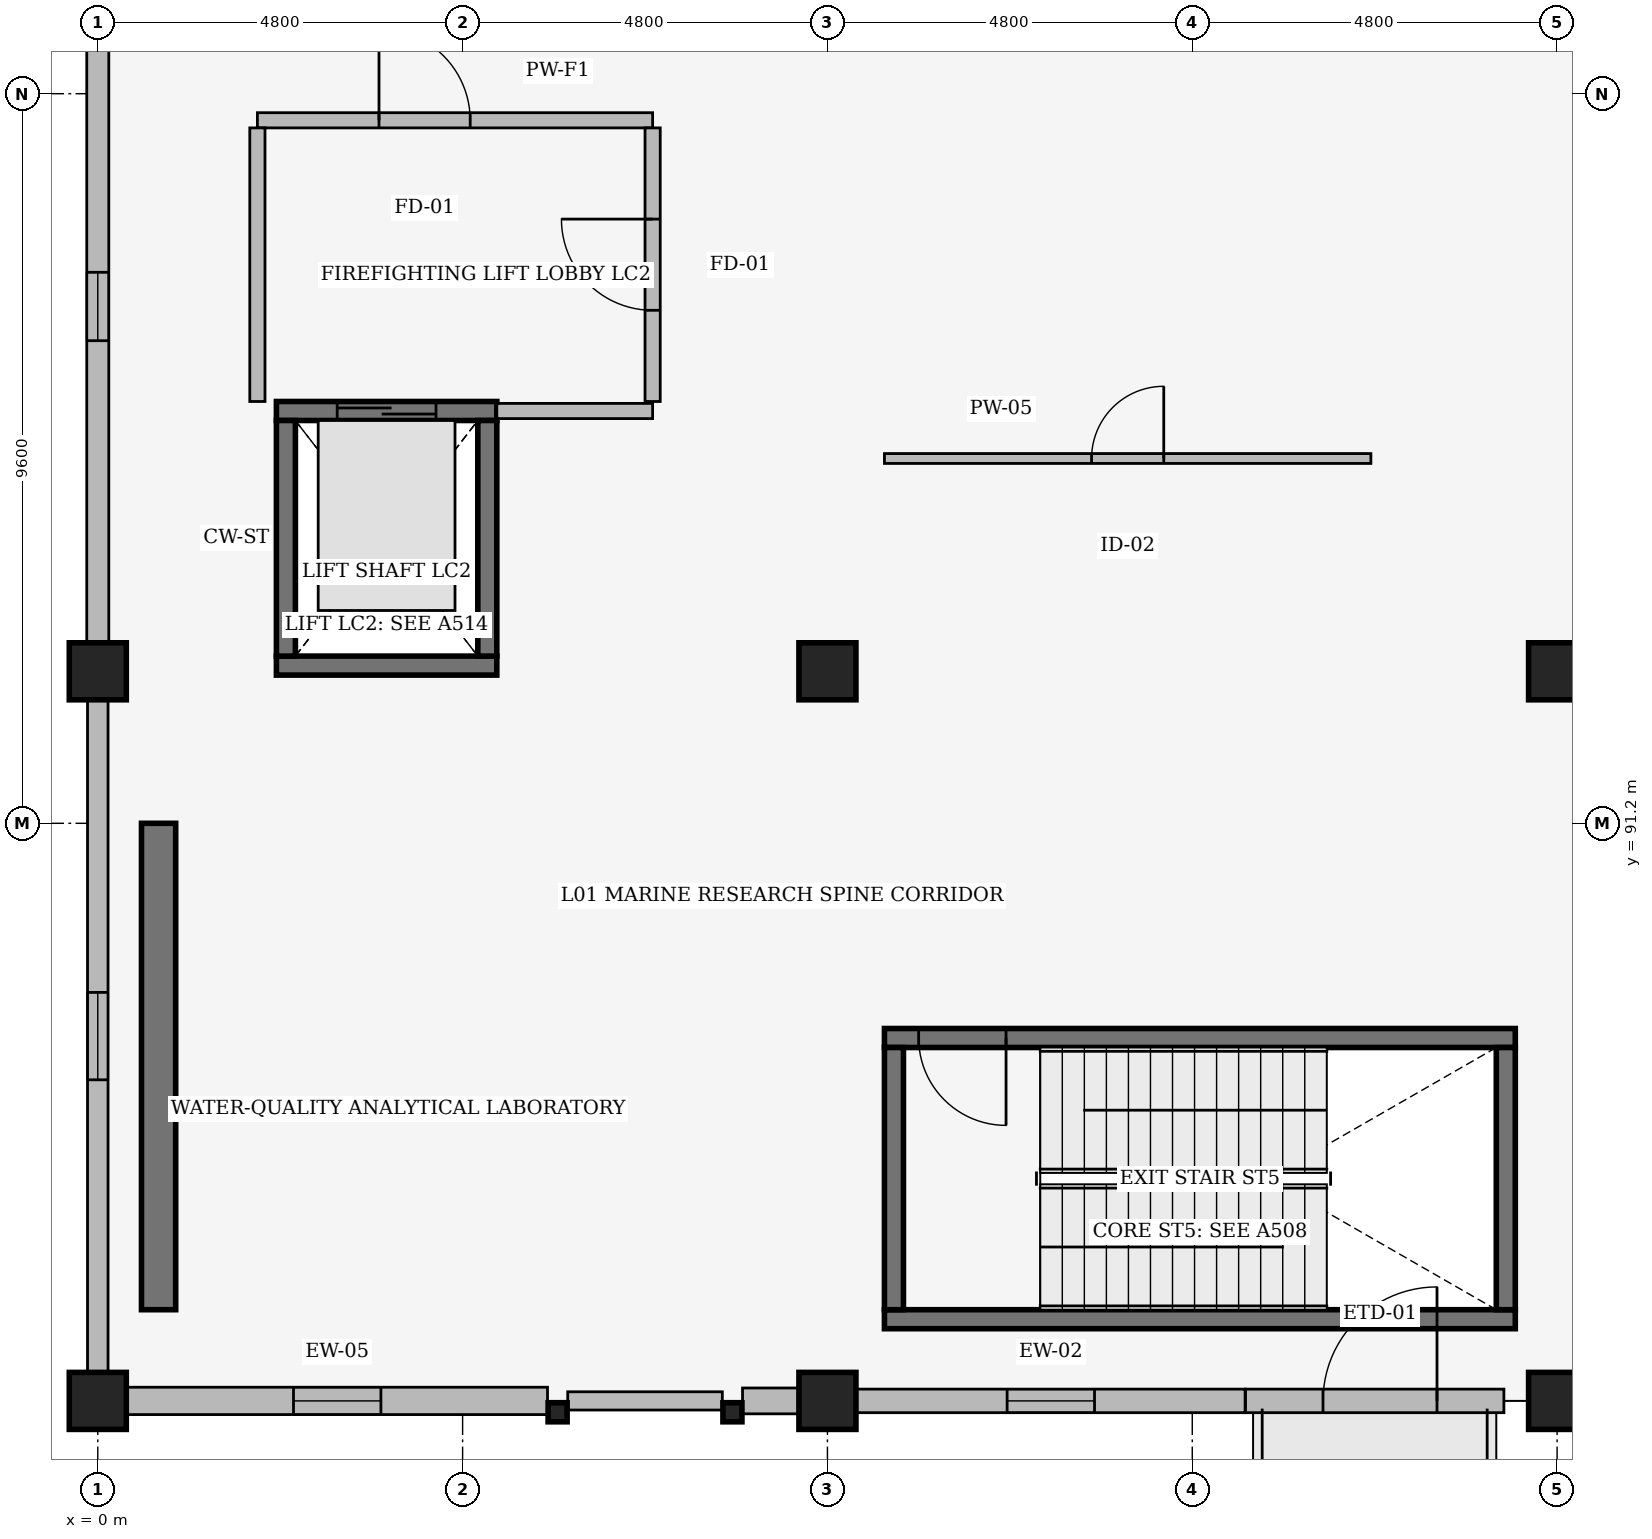
"""IFC4 building model, lengths in metres.
Left out: names, types, materials, properties, quantities, classifications, styles, units other than length and angle.
Written with IfcOpenShell. Run it as: python <this file> out.ifc"""

import sys

from ifc_helpers import new_model, si_unit, direction, frame, frame_2d, origin, origin_2d, place, context, subcontext, project, spatial, rectangle, hollow_rectangle, extrude, element, fill, save


model = new_model("IFC4")
c1 = context("Model", 3, precision=1e-05, world=origin(), true_north=direction((0.0, 1.0)))
c2 = subcontext(c1, "Body", "Model", "MODEL_VIEW")
j1 = project(units=[si_unit("LENGTHUNIT", "METRE"), si_unit("PLANEANGLEUNIT", "RADIAN")], contexts=[c1])
p1 = place(None, origin())
s1 = spatial("IfcSite", under=j1, at=p1, CompositionType="ELEMENT")
p2 = place(p1, origin())
s2 = spatial("IfcBuilding", under=s1, at=p2, CompositionType="ELEMENT")
p3 = place(p2, frame((0.0, 0.0, 5.4)))
s3 = spatial("IfcBuildingStorey", under=s2, at=p3, CompositionType="ELEMENT", Elevation=5.4)
for number, where, z_axis, x_axis in (
    (1, (0.0, 83.6, 0.0), (0.0, 0.0, 1.0), (1.0, 0.0, 0.0)),
    (2, (0.0, 93.2, 0.0), (0.0, 0.0, 1.0), (1.0, 0.0, 0.0)),
    (3, (9.6, 83.6, 0.0), (0.0, 0.0, 1.0), (1.0, 0.0, 0.0)),
    (4, (9.6, 93.2, 0.0), (0.0, 0.0, 1.0), (1.0, 0.0, 0.0)),
    (5, (19.2, 83.6, 0.0), (0.0, 0.0, 1.0), (1.0, 0.0, 0.0)),
    (6, (19.2, 93.2, 0.0), (0.0, 0.0, 1.0), (1.0, 0.0, 0.0)),
):
    element("IfcColumn", number, at=place(p3, frame(where, z_axis=z_axis, x_axis=x_axis)), inside=s3, PredefinedType="COLUMN", context=c2, shape_type="SweptSolid", body=[
        extrude(rectangle(XDim=0.75, YDim=0.75, at=origin_2d()), origin(), (0.0, 0.0, 1.0), 5.1),
    ])
for number, where, z_axis, x_axis in (
    (7, (6.05, 83.45, 0.0), (0.0, 0.0, 1.0), (1.0, 0.0, 0.0)),
    (8, (8.35, 83.45, 0.0), (0.0, 0.0, 1.0), (1.0, 0.0, 0.0)),
):
    element("IfcColumn", number, at=place(p3, frame(where, z_axis=z_axis, x_axis=x_axis)), inside=s3, PredefinedType="COLUMN", context=c2, shape_type="SweptSolid", body=[
        extrude(hollow_rectangle(XDim=0.25, YDim=0.25, WallThickness=0.012, InnerFilletRadius=0.012, OuterFilletRadius=0.025, at=origin_2d()), origin(), (0.0, 0.0, 1.0), 4.351),
    ])
p4 = place(p3, frame((0.8, 84.8, 0.0), z_axis=(0.0, 0.0, 1.0), x_axis=(0.0, 1.0, 0.0)))
e9 = element("IfcWall", 9, at=p4, inside=s3, PredefinedType="SHEAR", context=c2, shape_type="SweptSolid", body=[
    extrude(rectangle(XDim=6.4, YDim=0.45, at=frame_2d((3.2, 0.0))), origin(), (0.0, 0.0, 1.0), 5.1),
])
p5 = place(p3, frame((15.1, 83.6, 0.0), z_axis=(0.0, 0.0, 1.0), x_axis=(1.0, 0.0, 0.0)))
e10 = element("IfcWall", 10, at=p5, inside=s3, PredefinedType="SOLIDWALL", context=c2, shape_type="SweptSolid", body=[
    extrude(rectangle(XDim=3.4, YDim=0.31, at=frame_2d((1.7, 0.0))), origin(), (0.0, 0.0, 1.0), 4.563),
])
p6 = place(p5, frame((2.52, 0.0, 0.0), z_axis=(0.0, 0.0, 1.0), x_axis=(-1.0, 0.0, 0.0)))
e11 = element("IfcOpeningElement", 11, at=p6, cuts=e10, PredefinedType="OPENING", context=c2, shape_type="SweptSolid", body=[
    extrude(rectangle(XDim=1.5, YDim=2.25, at=frame_2d((0.75, 1.125))), frame((0.0, 0.165, 0.0), z_axis=(0.0, -1.0, 0.0), x_axis=(1.0, 0.0, 0.0)), (0.0, 0.0, 1.0), 0.33),
])
p7 = place(p3, frame((0.0, 102.417, 0.0), z_axis=(0.0, 0.0, 1.0), x_axis=(0.0, -1.0, 0.0)))
e12 = element("IfcWall", 12, at=p7, inside=s3, PredefinedType="SOLIDWALL", context=c2, shape_type="SweptSolid", body=[
    extrude(rectangle(XDim=8.834, YDim=0.29, at=frame_2d((4.417, 0.0))), origin(), (0.0, 0.0, 1.0), 4.349),
])
p8 = place(p7, frame((3.967, 0.0, 0.95)))
e13 = element("IfcOpeningElement", 13, at=p8, cuts=e12, PredefinedType="OPENING", context=c2, shape_type="SweptSolid", body=[
    extrude(rectangle(XDim=0.9, YDim=2.1, at=frame_2d((0.45, 1.05))), frame((0.0, 0.155, 0.0), z_axis=(0.0, -1.0, 0.0), x_axis=(1.0, 0.0, 0.0)), (0.0, 0.0, 1.0), 0.31),
])
p9 = place(p3, frame((0.0, 92.817, 0.0), z_axis=(0.0, 0.0, 1.0), x_axis=(0.0, -1.0, 0.0)))
e14 = element("IfcWall", 14, at=p9, inside=s3, PredefinedType="SOLIDWALL", context=c2, shape_type="SweptSolid", body=[
    extrude(rectangle(XDim=8.834, YDim=0.27, at=frame_2d((4.417, 0.0))), origin(), (0.0, 0.0, 1.0), 4.349),
])
p10 = place(p9, frame((3.842, 0.0, 0.95)))
e15 = element("IfcOpeningElement", 15, at=p10, cuts=e14, PredefinedType="OPENING", context=c2, shape_type="SweptSolid", body=[
    extrude(rectangle(XDim=1.15, YDim=1.2, at=frame_2d((0.575, 0.6))), frame((0.0, 0.145, 0.0), z_axis=(0.0, -1.0, 0.0), x_axis=(1.0, 0.0, 0.0)), (0.0, 0.0, 1.0), 0.29),
])
p11 = place(p3, frame((0.383, 83.6, 0.0), z_axis=(0.0, 0.0, 1.0), x_axis=(1.0, 0.0, 0.0)))
e16 = element("IfcWall", 16, at=p11, inside=s3, PredefinedType="SOLIDWALL", context=c2, shape_type="SweptSolid", body=[
    extrude(rectangle(XDim=5.534, YDim=0.36, at=frame_2d((2.767, 0.0))), origin(), (0.0, 0.0, 1.0), 4.321),
])
p12 = place(p11, frame((2.192, 0.0, 0.95)))
e17 = element("IfcOpeningElement", 17, at=p12, cuts=e16, PredefinedType="OPENING", context=c2, shape_type="SweptSolid", body=[
    extrude(rectangle(XDim=1.15, YDim=1.5, at=frame_2d((0.575, 0.75))), frame((0.0, 0.19, 0.0), z_axis=(0.0, -1.0, 0.0), x_axis=(1.0, 0.0, 0.0)), (0.0, 0.0, 1.0), 0.38),
])
p13 = place(p3, frame((6.183, 83.6, 0.0), z_axis=(0.0, 0.0, 1.0), x_axis=(1.0, 0.0, 0.0)))
e18 = element("IfcWall", 18, at=p13, inside=s3, PredefinedType="SOLIDWALL", context=c2, shape_type="SweptSolid", body=[
    extrude(rectangle(XDim=2.034, YDim=0.24, at=frame_2d((1.017, 0.0))), origin(), (0.0, 0.0, 1.0), 4.321),
])
p14 = place(p3, frame((8.483, 83.6, 0.0), z_axis=(0.0, 0.0, 1.0), x_axis=(1.0, 0.0, 0.0)))
e19 = element("IfcWall", 19, at=p14, inside=s3, PredefinedType="SOLIDWALL", context=c2, shape_type="SweptSolid", body=[
    extrude(rectangle(XDim=0.734, YDim=0.34, at=frame_2d((0.367, 0.0))), origin(), (0.0, 0.0, 1.0), 4.321),
])
p15 = place(p3, frame((9.983, 83.6, 0.0), z_axis=(0.0, 0.0, 1.0), x_axis=(1.0, 0.0, 0.0)))
e20 = element("IfcWall", 20, at=p15, inside=s3, PredefinedType="SOLIDWALL", context=c2, shape_type="SweptSolid", body=[
    extrude(rectangle(XDim=5.112, YDim=0.31, at=frame_2d((2.556, 0.0))), origin(), (0.0, 0.0, 1.0), 4.563),
])
p16 = place(p15, frame((1.981, 0.0, 0.95)))
e21 = element("IfcOpeningElement", 21, at=p16, cuts=e20, PredefinedType="OPENING", context=c2, shape_type="SweptSolid", body=[
    extrude(rectangle(XDim=1.15, YDim=1.8, at=frame_2d((0.575, 0.9))), frame((0.0, 0.165, 0.0), z_axis=(0.0, -1.0, 0.0), x_axis=(1.0, 0.0, 0.0)), (0.0, 0.0, 1.0), 0.33),
])
p17 = place(p3, frame((10.35, 84.675, 0.0), z_axis=(0.0, 0.0, 1.0), x_axis=(1.0, 0.0, 0.0)))
e22 = element("IfcWall", 22, at=p17, inside=s3, PredefinedType="SHEAR", context=c2, shape_type="SweptSolid", body=[
    extrude(rectangle(XDim=8.3, YDim=0.25, at=frame_2d((4.15, 0.0))), origin(), (0.0, 0.0, 1.0), 4.8),
])
p18 = place(p3, frame((18.65, 88.375, 0.0), z_axis=(0.0, 0.0, 1.0), x_axis=(-1.0, 0.0, 0.0)))
e23 = element("IfcWall", 23, at=p18, inside=s3, PredefinedType="SHEAR", context=c2, shape_type="SweptSolid", body=[
    extrude(rectangle(XDim=8.3, YDim=0.25, at=frame_2d((4.15, 0.0))), origin(), (0.0, 0.0, 1.0), 4.8),
])
p19 = place(p18, frame((7.85, 0.0, 0.0), z_axis=(0.0, 0.0, 1.0), x_axis=(-1.0, 0.0, 0.0)))
e24 = element("IfcOpeningElement", 24, at=p19, cuts=e23, PredefinedType="OPENING", context=c2, shape_type="SweptSolid", body=[
    extrude(rectangle(XDim=1.15, YDim=2.2, at=frame_2d((0.575, 1.1))), frame((0.0, 0.135, 0.0), z_axis=(0.0, -1.0, 0.0), x_axis=(1.0, 0.0, 0.0)), (0.0, 0.0, 1.0), 0.27),
])
for number, where, z_axis, x_axis in (
    (25, (10.475, 88.25, 0.0), (0.0, 0.0, 1.0), (0.0, -1.0, 0.0)),
    (26, (18.525, 84.8, 0.0), (0.0, 0.0, 1.0), (0.0, 1.0, 0.0)),
):
    element("IfcWall", number, at=place(p3, frame(where, z_axis=z_axis, x_axis=x_axis)), inside=s3, PredefinedType="SHEAR", context=c2, shape_type="SweptSolid", body=[
        extrude(rectangle(XDim=3.45, YDim=0.25, at=frame_2d((1.725, 0.0))), origin(), (0.0, 0.0, 1.0), 4.8),
    ])
p20 = place(p3, frame((2.35, 93.275, 0.0), z_axis=(0.0, 0.0, 1.0), x_axis=(1.0, 0.0, 0.0)))
e27 = element("IfcWall", 27, at=p20, inside=s3, PredefinedType="SHEAR", context=c2, shape_type="SweptSolid", body=[
    extrude(rectangle(XDim=2.9, YDim=0.25, at=frame_2d((1.45, 0.0))), origin(), (0.0, 0.0, 1.0), 4.8),
])
p21 = place(p3, frame((2.35, 96.625, 0.0), z_axis=(0.0, 0.0, 1.0), x_axis=(1.0, 0.0, 0.0)))
e28 = element("IfcWall", 28, at=p21, inside=s3, PredefinedType="SHEAR", context=c2, shape_type="SweptSolid", body=[
    extrude(rectangle(XDim=2.9, YDim=0.25, at=frame_2d((1.45, 0.0))), origin(), (0.0, 0.0, 1.0), 4.8),
])
p22 = place(p21, frame((0.8, 0.0, 0.0)))
e29 = element("IfcOpeningElement", 29, at=p22, cuts=e28, PredefinedType="OPENING", context=c2, shape_type="SweptSolid", body=[
    extrude(rectangle(XDim=1.3, YDim=2.2, at=frame_2d((0.65, 1.1))), frame((0.0, 0.135, 0.0), z_axis=(0.0, -1.0, 0.0), x_axis=(1.0, 0.0, 0.0)), (0.0, 0.0, 1.0), 0.27),
])
for number, where, z_axis, x_axis in (
    (30, (2.475, 93.4, 0.0), (0.0, 0.0, 1.0), (0.0, 1.0, 0.0)),
    (31, (5.125, 93.4, 0.0), (0.0, 0.0, 1.0), (0.0, 1.0, 0.0)),
):
    element("IfcWall", number, at=place(p3, frame(where, z_axis=z_axis, x_axis=x_axis)), inside=s3, PredefinedType="SHEAR", context=c2, shape_type="SweptSolid", body=[
        extrude(rectangle(XDim=3.1, YDim=0.25, at=frame_2d((1.55, 0.0))), origin(), (0.0, 0.0, 1.0), 4.8),
    ])
p23 = place(p3, frame((2.1, 100.45, 0.0), z_axis=(0.0, 0.0, 1.0), x_axis=(1.0, 0.0, 0.0)))
e32 = element("IfcWall", 32, at=p23, inside=s3, PredefinedType="PARTITIONING", context=c2, shape_type="SweptSolid", body=[
    extrude(rectangle(XDim=5.2, YDim=0.2, at=frame_2d((2.6, 0.0))), origin(), (0.0, 0.0, 1.0), 4.349),
])
p24 = place(p23, frame((1.6, 0.0, 0.0)))
e33 = element("IfcOpeningElement", 33, at=p24, cuts=e32, PredefinedType="OPENING", context=c2, shape_type="SweptSolid", body=[
    extrude(rectangle(XDim=1.2, YDim=2.2, at=frame_2d((0.6, 1.1))), frame((0.0, 0.11, 0.0), z_axis=(0.0, -1.0, 0.0), x_axis=(1.0, 0.0, 0.0)), (0.0, 0.0, 1.0), 0.22),
])
p25 = place(p3, frame((2.1, 96.75, 0.0), z_axis=(0.0, 0.0, 1.0), x_axis=(0.0, 1.0, 0.0)))
e34 = element("IfcWall", 34, at=p25, inside=s3, PredefinedType="PARTITIONING", context=c2, shape_type="SweptSolid", body=[
    extrude(rectangle(XDim=3.6, YDim=0.2, at=frame_2d((1.8, 0.0))), origin(), (0.0, 0.0, 1.0), 4.349),
])
p26 = place(p3, frame((7.3, 96.75, 0.0), z_axis=(0.0, 0.0, 1.0), x_axis=(0.0, 1.0, 0.0)))
e35 = element("IfcWall", 35, at=p26, inside=s3, PredefinedType="PARTITIONING", context=c2, shape_type="SweptSolid", body=[
    extrude(rectangle(XDim=3.6, YDim=0.2, at=frame_2d((1.8, 0.0))), origin(), (0.0, 0.0, 1.0), 4.349),
])
p27 = place(p26, frame((1.2, 0.0, 0.0)))
e36 = element("IfcOpeningElement", 36, at=p27, cuts=e35, PredefinedType="OPENING", context=c2, shape_type="SweptSolid", body=[
    extrude(rectangle(XDim=1.2, YDim=2.2, at=frame_2d((0.6, 1.1))), frame((0.0, 0.11, 0.0), z_axis=(0.0, -1.0, 0.0), x_axis=(1.0, 0.0, 0.0)), (0.0, 0.0, 1.0), 0.22),
])
p28 = place(p3, frame((5.25, 96.625, 0.0), z_axis=(0.0, 0.0, 1.0), x_axis=(1.0, 0.0, 0.0)))
e37 = element("IfcWall", 37, at=p28, inside=s3, PredefinedType="PARTITIONING", context=c2, shape_type="SweptSolid", body=[
    extrude(rectangle(XDim=2.05, YDim=0.2, at=frame_2d((1.025, 0.0))), origin(), (0.0, 0.0, 1.0), 4.74),
])
p29 = place(p3, frame((10.35, 96.0, 0.0), z_axis=(0.0, 0.0, 1.0), x_axis=(1.0, 0.0, 0.0)))
e38 = element("IfcWall", 38, at=p29, inside=s3, PredefinedType="PARTITIONING", context=c2, shape_type="SweptSolid", body=[
    extrude(rectangle(XDim=6.4, YDim=0.13, at=frame_2d((3.2, 0.0))), origin(), (0.0, 0.0, 1.0), 4.413),
])
p30 = place(p29, frame((2.725, 0.0, 0.0)))
e39 = element("IfcOpeningElement", 39, at=p30, cuts=e38, PredefinedType="OPENING", context=c2, shape_type="SweptSolid", body=[
    extrude(rectangle(XDim=0.95, YDim=2.15, at=frame_2d((0.475, 1.075))), frame((0.0, 0.075, 0.0), z_axis=(0.0, -1.0, 0.0), x_axis=(1.0, 0.0, 0.0)), (0.0, 0.0, 1.0), 0.15),
])
p31 = place(p6, origin())
e40 = element("IfcDoor", 40, at=p31, inside=s3, OperationType="SINGLE_SWING_LEFT", PredefinedType="DOOR", context=c2, shape_type="SweptSolid", body=[
    extrude(rectangle(XDim=1.5, YDim=2.25, at=frame_2d((0.75, 1.125))), frame((0.0, 0.025, 0.0), z_axis=(0.0, -1.0, 0.0), x_axis=(1.0, 0.0, 0.0)), (0.0, 0.0, 1.0), 0.05),
])
fill(e11, e40)
p32 = place(p8, origin())
e41 = element("IfcWindow", 41, at=p32, inside=s3, PartitioningType="SINGLE_PANEL", PredefinedType="WINDOW", context=c2, shape_type="SweptSolid", body=[
    extrude(rectangle(XDim=0.9, YDim=2.1, at=frame_2d((0.45, 1.05))), frame((0.0, 0.03, 0.0), z_axis=(0.0, -1.0, 0.0), x_axis=(1.0, 0.0, 0.0)), (0.0, 0.0, 1.0), 0.06),
])
fill(e13, e41)
p33 = place(p10, origin())
e42 = element("IfcWindow", 42, at=p33, inside=s3, PartitioningType="SINGLE_PANEL", PredefinedType="WINDOW", context=c2, shape_type="SweptSolid", body=[
    extrude(rectangle(XDim=1.15, YDim=1.2, at=frame_2d((0.575, 0.6))), frame((0.0, 0.03, 0.0), z_axis=(0.0, -1.0, 0.0), x_axis=(1.0, 0.0, 0.0)), (0.0, 0.0, 1.0), 0.06),
])
fill(e15, e42)
p34 = place(p12, origin())
e43 = element("IfcWindow", 43, at=p34, inside=s3, PartitioningType="SINGLE_PANEL", PredefinedType="WINDOW", context=c2, shape_type="SweptSolid", body=[
    extrude(rectangle(XDim=1.15, YDim=1.5, at=frame_2d((0.575, 0.75))), frame((0.0, 0.03, 0.0), z_axis=(0.0, -1.0, 0.0), x_axis=(1.0, 0.0, 0.0)), (0.0, 0.0, 1.0), 0.06),
])
fill(e17, e43)
p35 = place(p16, origin())
e44 = element("IfcWindow", 44, at=p35, inside=s3, PartitioningType="SINGLE_PANEL", PredefinedType="WINDOW", context=c2, shape_type="SweptSolid", body=[
    extrude(rectangle(XDim=1.15, YDim=1.8, at=frame_2d((0.575, 0.9))), frame((0.0, 0.03, 0.0), z_axis=(0.0, -1.0, 0.0), x_axis=(1.0, 0.0, 0.0)), (0.0, 0.0, 1.0), 0.06),
])
fill(e21, e44)
p36 = place(p19, origin())
e45 = element("IfcDoor", 45, at=p36, inside=s3, OperationType="SINGLE_SWING_RIGHT", PredefinedType="DOOR", context=c2, shape_type="SweptSolid", body=[
    extrude(rectangle(XDim=1.15, YDim=2.2, at=frame_2d((0.575, 1.1))), frame((0.0, 0.025, 0.0), z_axis=(0.0, -1.0, 0.0), x_axis=(1.0, 0.0, 0.0)), (0.0, 0.0, 1.0), 0.05),
])
fill(e24, e45)
p37 = place(p22, origin())
e46 = element("IfcDoor", 46, at=p37, inside=s3, OperationType="DOUBLE_DOOR_SLIDING", PredefinedType="DOOR", context=c2, shape_type="SweptSolid", body=[
    extrude(rectangle(XDim=1.3, YDim=2.2, at=frame_2d((0.65, 1.1))), frame((0.0, 0.025, 0.0), z_axis=(0.0, -1.0, 0.0), x_axis=(1.0, 0.0, 0.0)), (0.0, 0.0, 1.0), 0.05),
])
fill(e29, e46)
p38 = place(p27, origin())
e47 = element("IfcDoor", 47, at=p38, inside=s3, OperationType="SINGLE_SWING_RIGHT", PredefinedType="DOOR", context=c2, shape_type="SweptSolid", body=[
    extrude(rectangle(XDim=1.2, YDim=2.2, at=frame_2d((0.6, 1.1))), frame((0.0, 0.025, 0.0), z_axis=(0.0, -1.0, 0.0), x_axis=(1.0, 0.0, 0.0)), (0.0, 0.0, 1.0), 0.05),
])
fill(e36, e47)
p39 = place(p24, origin())
e48 = element("IfcDoor", 48, at=p39, inside=s3, OperationType="SINGLE_SWING_LEFT", PredefinedType="DOOR", context=c2, shape_type="SweptSolid", body=[
    extrude(rectangle(XDim=1.2, YDim=2.2, at=frame_2d((0.6, 1.1))), frame((0.0, 0.025, 0.0), z_axis=(0.0, -1.0, 0.0), x_axis=(1.0, 0.0, 0.0)), (0.0, 0.0, 1.0), 0.05),
])
fill(e33, e48)
p40 = place(p30, origin())
e49 = element("IfcDoor", 49, at=p40, inside=s3, OperationType="SINGLE_SWING_RIGHT", PredefinedType="DOOR", context=c2, shape_type="SweptSolid", body=[
    extrude(rectangle(XDim=0.95, YDim=2.15, at=frame_2d((0.475, 1.075))), frame((0.0, 0.025, 0.0), z_axis=(0.0, -1.0, 0.0), x_axis=(1.0, 0.0, 0.0)), (0.0, 0.0, 1.0), 0.05),
])
fill(e39, e49)
save(model, sys.argv[1])
